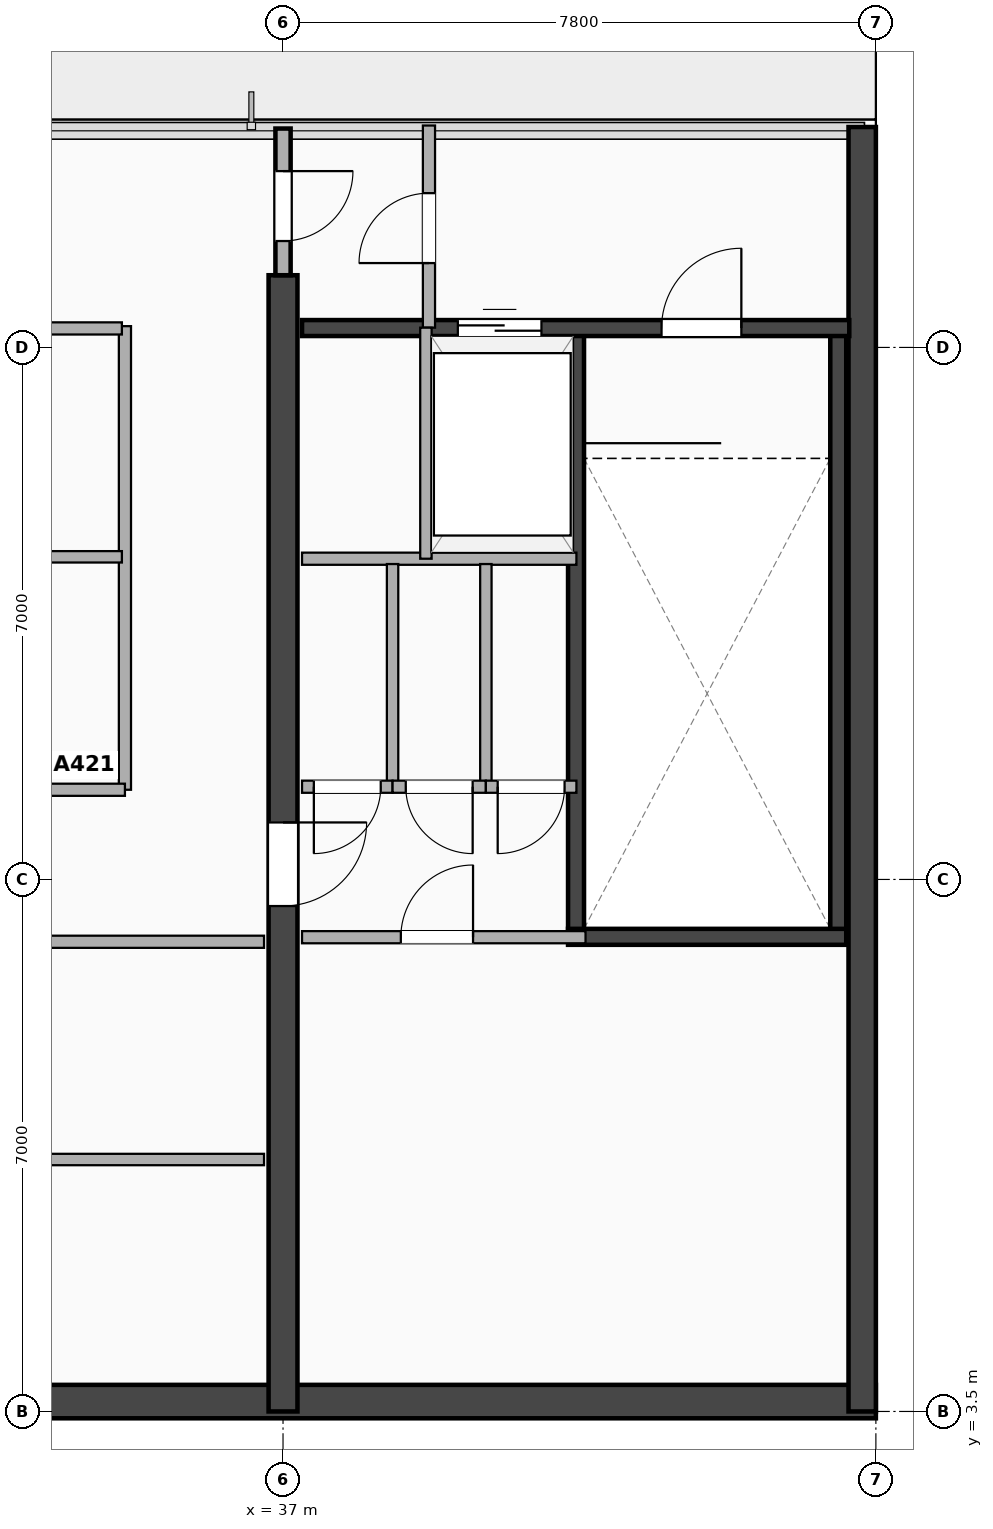
"""IFC4 building model, lengths in metres.
Left out: names, types, materials, properties, quantities, classifications, styles, units other than length and angle.
Written with IfcOpenShell. Run it as: python <this file> out.ifc"""

import sys

from ifc_helpers import new_model, si_unit, direction, frame, frame_2d, origin, place, context, subcontext, project, spatial, rectangle, extrude, element, fill, save


model = new_model("IFC4")
c1 = context("Model", 3, precision=1e-05, world=origin(), true_north=direction((0.0, 1.0)))
c2 = subcontext(c1, "Body", "Model", "MODEL_VIEW")
j1 = project(units=[si_unit("LENGTHUNIT", "METRE"), si_unit("PLANEANGLEUNIT", "RADIAN")], contexts=[c1])
p1 = place(None, origin())
s1 = spatial("IfcSite", under=j1, at=p1, CompositionType="ELEMENT")
p2 = place(p1, origin())
s2 = spatial("IfcBuilding", under=s1, at=p2, CompositionType="ELEMENT")
p3 = place(p2, frame((0.0, 0.0, 317.1)))
s3 = spatial("IfcBuildingStorey", under=s2, at=p3, CompositionType="ELEMENT", Elevation=317.1)
p4 = place(p3, frame((20.3, 3.63, 0.0), z_axis=(0.0, 0.0, 1.0), x_axis=(1.0, 0.0, 0.0)))
e1 = element("IfcWall", 1, at=p4, inside=s3, PredefinedType="SHEAR", context=c2, shape_type="SweptSolid", body=[
    extrude(rectangle(XDim=24.5, YDim=0.44, at=frame_2d((12.25, 0.0))), origin(), (0.0, 0.0, 1.0), 4.3),
])
p5 = place(p3, frame((44.62, 3.5, 0.0), z_axis=(0.0, 0.0, 1.0), x_axis=(0.0, 1.0, 0.0)))
e2 = element("IfcWall", 2, at=p5, inside=s3, PredefinedType="SHEAR", context=c2, shape_type="SweptSolid", body=[
    extrude(rectangle(XDim=16.9, YDim=0.36, at=frame_2d((8.45, 0.0))), origin(), (0.0, 0.0, 1.0), 4.3),
])
p6 = place(p3, frame((37.0, 3.5, 0.0), z_axis=(0.0, 0.0, 1.0), x_axis=(0.0, 1.0, 0.0)))
e3 = element("IfcWall", 3, at=p6, inside=s3, PredefinedType="SHEAR", context=c2, shape_type="SweptSolid", body=[
    extrude(rectangle(XDim=14.95, YDim=0.38, at=frame_2d((7.475, 0.0))), origin(), (0.0, 0.0, 1.0), 4.3),
])
p7 = place(p6, frame((6.65, 0.0, 0.0)))
e4 = element("IfcOpeningElement", 4, at=p7, cuts=e3, PredefinedType="OPENING", context=c2, shape_type="SweptSolid", body=[
    extrude(rectangle(XDim=1.1, YDim=2.15, at=frame_2d((0.55, 1.075))), frame((0.0, 0.2, 0.0), z_axis=(0.0, -1.0, 0.0), x_axis=(1.0, 0.0, 0.0)), (0.0, 0.0, 1.0), 0.4),
])
for number, where, z_axis, x_axis in (
    (5, (40.855, 9.745, 0.0), (0.0, 0.0, 1.0), (0.0, 1.0, 0.0)),
    (6, (44.305, 9.745, 0.0), (0.0, 0.0, 1.0), (0.0, 1.0, 0.0)),
):
    element("IfcWall", number, at=place(p3, frame(where, z_axis=z_axis, x_axis=x_axis)), inside=s3, PredefinedType="SHEAR", context=c2, shape_type="SweptSolid", body=[
        extrude(rectangle(XDim=8.01, YDim=0.21, at=frame_2d((4.005, 0.0))), origin(), (0.0, 0.0, 1.0), 4.3),
    ])
p8 = place(p3, frame((40.75, 9.745, 0.0), z_axis=(0.0, 0.0, 1.0), x_axis=(1.0, 0.0, 0.0)))
e7 = element("IfcWall", 7, at=p8, inside=s3, PredefinedType="SHEAR", context=c2, shape_type="SweptSolid", body=[
    extrude(rectangle(XDim=3.66, YDim=0.21, at=frame_2d((1.83, 0.0))), origin(), (0.0, 0.0, 1.0), 4.3),
])
p9 = place(p3, frame((37.25, 17.755, 0.0), z_axis=(0.0, 0.0, 1.0), x_axis=(1.0, 0.0, 0.0)))
e8 = element("IfcWall", 8, at=p9, inside=s3, PredefinedType="SHEAR", context=c2, shape_type="SweptSolid", body=[
    extrude(rectangle(XDim=7.2, YDim=0.21, at=frame_2d((3.6, 0.0))), origin(), (0.0, 0.0, 1.0), 4.3),
])
p10 = place(p9, frame((2.05, 0.0, 0.0)))
e9 = element("IfcOpeningElement", 9, at=p10, cuts=e8, PredefinedType="OPENING", context=c2, shape_type="SweptSolid", body=[
    extrude(rectangle(XDim=1.1, YDim=2.18, at=frame_2d((0.55, 1.09))), frame((0.0, 0.115, 0.0), z_axis=(0.0, -1.0, 0.0), x_axis=(1.0, 0.0, 0.0)), (0.0, 0.0, 1.0), 0.23),
])
p11 = place(p9, frame((5.78, 0.0, 0.0), z_axis=(0.0, 0.0, 1.0), x_axis=(-1.0, 0.0, 0.0)))
e10 = element("IfcOpeningElement", 10, at=p11, cuts=e8, PredefinedType="OPENING", context=c2, shape_type="SweptSolid", body=[
    extrude(rectangle(XDim=1.05, YDim=2.15, at=frame_2d((0.525, 1.075))), frame((0.0, 0.115, 0.0), z_axis=(0.0, -1.0, 0.0), x_axis=(1.0, 0.0, 0.0)), (0.0, 0.0, 1.0), 0.23),
])
p12 = place(p3, frame((38.92, 17.76, 0.0), z_axis=(0.0, 0.0, 1.0), x_axis=(0.0, 1.0, 0.0)))
e11 = element("IfcWall", 11, at=p12, inside=s3, PredefinedType="PARTITIONING", context=c2, shape_type="SweptSolid", body=[
    extrude(rectangle(XDim=2.66, YDim=0.16, at=frame_2d((1.33, 0.0))), origin(), (0.0, 0.0, 1.0), 4.3),
])
p13 = place(p12, frame((1.77, 0.0, 0.0), z_axis=(0.0, 0.0, 1.0), x_axis=(-1.0, 0.0, 0.0)))
e12 = element("IfcOpeningElement", 12, at=p13, cuts=e11, PredefinedType="OPENING", context=c2, shape_type="SweptSolid", body=[
    extrude(rectangle(XDim=0.92, YDim=2.08, at=frame_2d((0.46, 1.04))), frame((0.0, 0.09, 0.0), z_axis=(0.0, -1.0, 0.0), x_axis=(1.0, 0.0, 0.0)), (0.0, 0.0, 1.0), 0.18),
])
p14 = place(p3, frame((37.25, 14.72, 0.0), z_axis=(0.0, 0.0, 1.0), x_axis=(1.0, 0.0, 0.0)))
e13 = element("IfcWall", 13, at=p14, inside=s3, PredefinedType="PARTITIONING", context=c2, shape_type="SweptSolid", body=[
    extrude(rectangle(XDim=3.61, YDim=0.16, at=frame_2d((1.805, 0.0))), origin(), (0.0, 0.0, 1.0), 4.3),
])
p15 = place(p3, frame((38.88, 14.72, 0.0), z_axis=(0.0, 0.0, 1.0), x_axis=(0.0, 1.0, 0.0)))
e14 = element("IfcWall", 14, at=p15, inside=s3, PredefinedType="PARTITIONING", context=c2, shape_type="SweptSolid", body=[
    extrude(rectangle(XDim=3.04, YDim=0.15, at=frame_2d((1.52, 0.0))), origin(), (0.0, 0.0, 1.0), 4.3),
])
p16 = place(p3, frame((37.0, 18.45, 0.0), z_axis=(0.0, 0.0, 1.0), x_axis=(0.0, 1.0, 0.0)))
e15 = element("IfcWall", 15, at=p16, inside=s3, PredefinedType="PARTITIONING", context=c2, shape_type="SweptSolid", body=[
    extrude(rectangle(XDim=1.93, YDim=0.2, at=frame_2d((0.965, 0.0))), origin(), (0.0, 0.0, 1.0), 4.3),
])
p17 = place(p16, frame((0.45, 0.0, 0.0)))
e16 = element("IfcOpeningElement", 16, at=p17, cuts=e15, PredefinedType="OPENING", context=c2, shape_type="SweptSolid", body=[
    extrude(rectangle(XDim=0.92, YDim=2.08, at=frame_2d((0.46, 1.04))), frame((0.0, 0.11, 0.0), z_axis=(0.0, -1.0, 0.0), x_axis=(1.0, 0.0, 0.0)), (0.0, 0.0, 1.0), 0.22),
])
p18 = place(p3, frame((38.441, 11.72, 0.0), z_axis=(0.0, 0.0, 1.0), x_axis=(0.0, 1.0, 0.0)))
e17 = element("IfcWall", 17, at=p18, inside=s3, PredefinedType="PARTITIONING", context=c2, shape_type="SweptSolid", body=[
    extrude(rectangle(XDim=2.93, YDim=0.15, at=frame_2d((1.465, 0.0))), origin(), (0.0, 0.0, 1.0), 4.3),
])
p19 = place(p3, frame((37.25, 11.72, 0.0), z_axis=(0.0, 0.0, 1.0), x_axis=(1.0, 0.0, 0.0)))
e18 = element("IfcWall", 18, at=p19, inside=s3, PredefinedType="PARTITIONING", context=c2, shape_type="SweptSolid", body=[
    extrude(rectangle(XDim=1.191, YDim=0.16, at=frame_2d((0.596, 0.0))), origin(), (0.0, 0.0, 1.0), 4.3),
])
p20 = place(p19, frame((0.156, 0.0, 0.0)))
e19 = element("IfcOpeningElement", 19, at=p20, cuts=e18, PredefinedType="OPENING", context=c2, shape_type="SweptSolid", body=[
    extrude(rectangle(XDim=0.88, YDim=2.08, at=frame_2d((0.44, 1.04))), frame((0.0, 0.09, 0.0), z_axis=(0.0, -1.0, 0.0), x_axis=(1.0, 0.0, 0.0)), (0.0, 0.0, 1.0), 0.18),
])
p21 = place(p3, frame((39.669, 11.72, 0.0), z_axis=(0.0, 0.0, 1.0), x_axis=(0.0, 1.0, 0.0)))
e20 = element("IfcWall", 20, at=p21, inside=s3, PredefinedType="PARTITIONING", context=c2, shape_type="SweptSolid", body=[
    extrude(rectangle(XDim=2.93, YDim=0.15, at=frame_2d((1.465, 0.0))), origin(), (0.0, 0.0, 1.0), 4.3),
])
p22 = place(p3, frame((38.441, 11.72, 0.0), z_axis=(0.0, 0.0, 1.0), x_axis=(1.0, 0.0, 0.0)))
e21 = element("IfcWall", 21, at=p22, inside=s3, PredefinedType="PARTITIONING", context=c2, shape_type="SweptSolid", body=[
    extrude(rectangle(XDim=1.227, YDim=0.16, at=frame_2d((0.614, 0.0))), origin(), (0.0, 0.0, 1.0), 4.3),
])
p23 = place(p22, frame((0.174, 0.0, 0.0)))
e22 = element("IfcOpeningElement", 22, at=p23, cuts=e21, PredefinedType="OPENING", context=c2, shape_type="SweptSolid", body=[
    extrude(rectangle(XDim=0.88, YDim=2.08, at=frame_2d((0.44, 1.04))), frame((0.0, 0.09, 0.0), z_axis=(0.0, -1.0, 0.0), x_axis=(1.0, 0.0, 0.0)), (0.0, 0.0, 1.0), 0.18),
])
p24 = place(p3, frame((39.669, 11.72, 0.0), z_axis=(0.0, 0.0, 1.0), x_axis=(1.0, 0.0, 0.0)))
e23 = element("IfcWall", 23, at=p24, inside=s3, PredefinedType="PARTITIONING", context=c2, shape_type="SweptSolid", body=[
    extrude(rectangle(XDim=1.191, YDim=0.16, at=frame_2d((0.596, 0.0))), origin(), (0.0, 0.0, 1.0), 4.3),
])
p25 = place(p24, frame((0.156, 0.0, 0.0)))
e24 = element("IfcOpeningElement", 24, at=p25, cuts=e23, PredefinedType="OPENING", context=c2, shape_type="SweptSolid", body=[
    extrude(rectangle(XDim=0.88, YDim=2.08, at=frame_2d((0.44, 1.04))), frame((0.0, 0.09, 0.0), z_axis=(0.0, -1.0, 0.0), x_axis=(1.0, 0.0, 0.0)), (0.0, 0.0, 1.0), 0.18),
])
p26 = place(p3, frame((37.25, 9.74, 0.0), z_axis=(0.0, 0.0, 1.0), x_axis=(1.0, 0.0, 0.0)))
e25 = element("IfcWall", 25, at=p26, inside=s3, PredefinedType="PARTITIONING", context=c2, shape_type="SweptSolid", body=[
    extrude(rectangle(XDim=3.73, YDim=0.16, at=frame_2d((1.865, 0.0))), origin(), (0.0, 0.0, 1.0), 4.3),
])
p27 = place(p26, frame((2.25, 0.0, 0.0), z_axis=(0.0, 0.0, 1.0), x_axis=(-1.0, 0.0, 0.0)))
e26 = element("IfcOpeningElement", 26, at=p27, cuts=e25, PredefinedType="OPENING", context=c2, shape_type="SweptSolid", body=[
    extrude(rectangle(XDim=0.95, YDim=2.15, at=frame_2d((0.475, 1.075))), frame((0.0, 0.09, 0.0), z_axis=(0.0, -1.0, 0.0), x_axis=(1.0, 0.0, 0.0)), (0.0, 0.0, 1.0), 0.18),
])
p28 = place(p3, frame((34.92, 11.68, 0.0), z_axis=(0.0, 0.0, 1.0), x_axis=(0.0, 1.0, 0.0)))
e27 = element("IfcWall", 27, at=p28, inside=s3, PredefinedType="PARTITIONING", context=c2, shape_type="SweptSolid", body=[
    extrude(rectangle(XDim=6.1, YDim=0.16, at=frame_2d((3.05, 0.0))), origin(), (0.0, 0.0, 1.0), 4.3),
])
p29 = place(p3, frame((29.45, 9.68, 0.0), z_axis=(0.0, 0.0, 1.0), x_axis=(1.0, 0.0, 0.0)))
e28 = element("IfcWall", 28, at=p29, inside=s3, PredefinedType="PARTITIONING", context=c2, shape_type="SweptSolid", body=[
    extrude(rectangle(XDim=7.3, YDim=0.16, at=frame_2d((3.65, 0.0))), origin(), (0.0, 0.0, 1.0), 4.3),
])
p30 = place(p29, frame((4.11, 0.0, 0.0), z_axis=(0.0, 0.0, 1.0), x_axis=(-1.0, 0.0, 0.0)))
e29 = element("IfcOpeningElement", 29, at=p30, cuts=e28, PredefinedType="OPENING", context=c2, shape_type="SweptSolid", body=[
    extrude(rectangle(XDim=0.92, YDim=2.08, at=frame_2d((0.46, 1.04))), frame((0.0, 0.09, 0.0), z_axis=(0.0, -1.0, 0.0), x_axis=(1.0, 0.0, 0.0)), (0.0, 0.0, 1.0), 0.18),
])
p31 = place(p3, frame((29.45, 6.815, 0.0), z_axis=(0.0, 0.0, 1.0), x_axis=(1.0, 0.0, 0.0)))
e30 = element("IfcWall", 30, at=p31, inside=s3, PredefinedType="PARTITIONING", context=c2, shape_type="SweptSolid", body=[
    extrude(rectangle(XDim=7.3, YDim=0.15, at=frame_2d((3.65, 0.0))), origin(), (0.0, 0.0, 1.0), 4.3),
])
p32 = place(p31, frame((4.09, 0.0, 0.0), z_axis=(0.0, 0.0, 1.0), x_axis=(-1.0, 0.0, 0.0)))
e31 = element("IfcOpeningElement", 31, at=p32, cuts=e30, PredefinedType="OPENING", context=c2, shape_type="SweptSolid", body=[
    extrude(rectangle(XDim=0.88, YDim=2.08, at=frame_2d((0.44, 1.04))), frame((0.0, 0.085, 0.0), z_axis=(0.0, -1.0, 0.0), x_axis=(1.0, 0.0, 0.0)), (0.0, 0.0, 1.0), 0.17),
])
p33 = place(p3, frame((29.2, 11.68, 0.0), z_axis=(0.0, 0.0, 1.0), x_axis=(1.0, 0.0, 0.0)))
e32 = element("IfcWall", 32, at=p33, inside=s3, PredefinedType="PARTITIONING", context=c2, shape_type="SweptSolid", body=[
    extrude(rectangle(XDim=5.72, YDim=0.16, at=frame_2d((2.86, 0.0))), origin(), (0.0, 0.0, 1.0), 4.3),
])
p34 = place(p3, frame((29.45, 17.75, 0.0), z_axis=(0.0, 0.0, 1.0), x_axis=(1.0, 0.0, 0.0)))
e33 = element("IfcWall", 33, at=p34, inside=s3, PredefinedType="PARTITIONING", context=c2, shape_type="SweptSolid", body=[
    extrude(rectangle(XDim=5.43, YDim=0.16, at=frame_2d((2.715, 0.0))), origin(), (0.0, 0.0, 1.0), 4.3),
])
p35 = place(p34, frame((3.175, 0.0, 0.0), z_axis=(0.0, 0.0, 1.0), x_axis=(-1.0, 0.0, 0.0)))
e34 = element("IfcOpeningElement", 34, at=p35, cuts=e33, PredefinedType="OPENING", context=c2, shape_type="SweptSolid", body=[
    extrude(rectangle(XDim=0.92, YDim=2.08, at=frame_2d((0.46, 1.04))), frame((0.0, 0.09, 0.0), z_axis=(0.0, -1.0, 0.0), x_axis=(1.0, 0.0, 0.0)), (0.0, 0.0, 1.0), 0.18),
])
p36 = place(p3, frame((29.45, 14.745, 0.0), z_axis=(0.0, 0.0, 1.0), x_axis=(1.0, 0.0, 0.0)))
e35 = element("IfcWall", 35, at=p36, inside=s3, PredefinedType="PARTITIONING", context=c2, shape_type="SweptSolid", body=[
    extrude(rectangle(XDim=5.43, YDim=0.15, at=frame_2d((2.715, 0.0))), origin(), (0.0, 0.0, 1.0), 4.3),
])
p37 = place(p36, frame((3.155, 0.0, 0.0), z_axis=(0.0, 0.0, 1.0), x_axis=(-1.0, 0.0, 0.0)))
e36 = element("IfcOpeningElement", 36, at=p37, cuts=e35, PredefinedType="OPENING", context=c2, shape_type="SweptSolid", body=[
    extrude(rectangle(XDim=0.88, YDim=2.08, at=frame_2d((0.44, 1.04))), frame((0.0, 0.085, 0.0), z_axis=(0.0, -1.0, 0.0), x_axis=(1.0, 0.0, 0.0)), (0.0, 0.0, 1.0), 0.17),
])
p38 = place(p10, origin())
e37 = element("IfcDoor", 37, at=p38, inside=s3, OperationType="DOUBLE_DOOR_SLIDING", PredefinedType="DOOR", context=c2, shape_type="SweptSolid", body=[
    extrude(rectangle(XDim=1.1, YDim=2.18, at=frame_2d((0.55, 1.09))), frame((0.0, 0.025, 0.0), z_axis=(0.0, -1.0, 0.0), x_axis=(1.0, 0.0, 0.0)), (0.0, 0.0, 1.0), 0.05),
])
fill(e9, e37)
p39 = place(p11, origin())
e38 = element("IfcDoor", 38, at=p39, inside=s3, OperationType="SINGLE_SWING_RIGHT", PredefinedType="DOOR", context=c2, shape_type="SweptSolid", body=[
    extrude(rectangle(XDim=1.05, YDim=2.15, at=frame_2d((0.525, 1.075))), frame((0.0, 0.025, 0.0), z_axis=(0.0, -1.0, 0.0), x_axis=(1.0, 0.0, 0.0)), (0.0, 0.0, 1.0), 0.05),
])
fill(e10, e38)
p40 = place(p7, origin())
e39 = element("IfcDoor", 39, at=p40, inside=s3, OperationType="SINGLE_SWING_RIGHT", PredefinedType="DOOR", context=c2, shape_type="SweptSolid", body=[
    extrude(rectangle(XDim=1.1, YDim=2.15, at=frame_2d((0.55, 1.075))), frame((0.0, 0.025, 0.0), z_axis=(0.0, -1.0, 0.0), x_axis=(1.0, 0.0, 0.0)), (0.0, 0.0, 1.0), 0.05),
])
fill(e4, e39)
p41 = place(p13, origin())
e40 = element("IfcDoor", 40, at=p41, inside=s3, OperationType="SINGLE_SWING_LEFT", PredefinedType="DOOR", context=c2, shape_type="SweptSolid", body=[
    extrude(rectangle(XDim=0.92, YDim=2.08, at=frame_2d((0.46, 1.04))), frame((0.0, 0.025, 0.0), z_axis=(0.0, -1.0, 0.0), x_axis=(1.0, 0.0, 0.0)), (0.0, 0.0, 1.0), 0.05),
])
fill(e12, e40)
p42 = place(p17, origin())
e41 = element("IfcDoor", 41, at=p42, inside=s3, OperationType="SINGLE_SWING_RIGHT", PredefinedType="DOOR", context=c2, shape_type="SweptSolid", body=[
    extrude(rectangle(XDim=0.92, YDim=2.08, at=frame_2d((0.46, 1.04))), frame((0.0, 0.025, 0.0), z_axis=(0.0, -1.0, 0.0), x_axis=(1.0, 0.0, 0.0)), (0.0, 0.0, 1.0), 0.05),
])
fill(e16, e41)
p43 = place(p20, origin())
e42 = element("IfcDoor", 42, at=p43, inside=s3, OperationType="SINGLE_SWING_LEFT", PredefinedType="DOOR", context=c2, shape_type="SweptSolid", body=[
    extrude(rectangle(XDim=0.88, YDim=2.08, at=frame_2d((0.44, 1.04))), frame((0.0, 0.025, 0.0), z_axis=(0.0, -1.0, 0.0), x_axis=(1.0, 0.0, 0.0)), (0.0, 0.0, 1.0), 0.05),
])
fill(e19, e42)
p44 = place(p23, origin())
e43 = element("IfcDoor", 43, at=p44, inside=s3, OperationType="SINGLE_SWING_RIGHT", PredefinedType="DOOR", context=c2, shape_type="SweptSolid", body=[
    extrude(rectangle(XDim=0.88, YDim=2.08, at=frame_2d((0.44, 1.04))), frame((0.0, 0.025, 0.0), z_axis=(0.0, -1.0, 0.0), x_axis=(1.0, 0.0, 0.0)), (0.0, 0.0, 1.0), 0.05),
])
fill(e22, e43)
p45 = place(p25, origin())
e44 = element("IfcDoor", 44, at=p45, inside=s3, OperationType="SINGLE_SWING_LEFT", PredefinedType="DOOR", context=c2, shape_type="SweptSolid", body=[
    extrude(rectangle(XDim=0.88, YDim=2.08, at=frame_2d((0.44, 1.04))), frame((0.0, 0.025, 0.0), z_axis=(0.0, -1.0, 0.0), x_axis=(1.0, 0.0, 0.0)), (0.0, 0.0, 1.0), 0.05),
])
fill(e24, e44)
p46 = place(p27, origin())
e45 = element("IfcDoor", 45, at=p46, inside=s3, OperationType="SINGLE_SWING_RIGHT", PredefinedType="DOOR", context=c2, shape_type="SweptSolid", body=[
    extrude(rectangle(XDim=0.95, YDim=2.15, at=frame_2d((0.475, 1.075))), frame((0.0, 0.025, 0.0), z_axis=(0.0, -1.0, 0.0), x_axis=(1.0, 0.0, 0.0)), (0.0, 0.0, 1.0), 0.05),
])
fill(e26, e45)
save(model, sys.argv[1])
